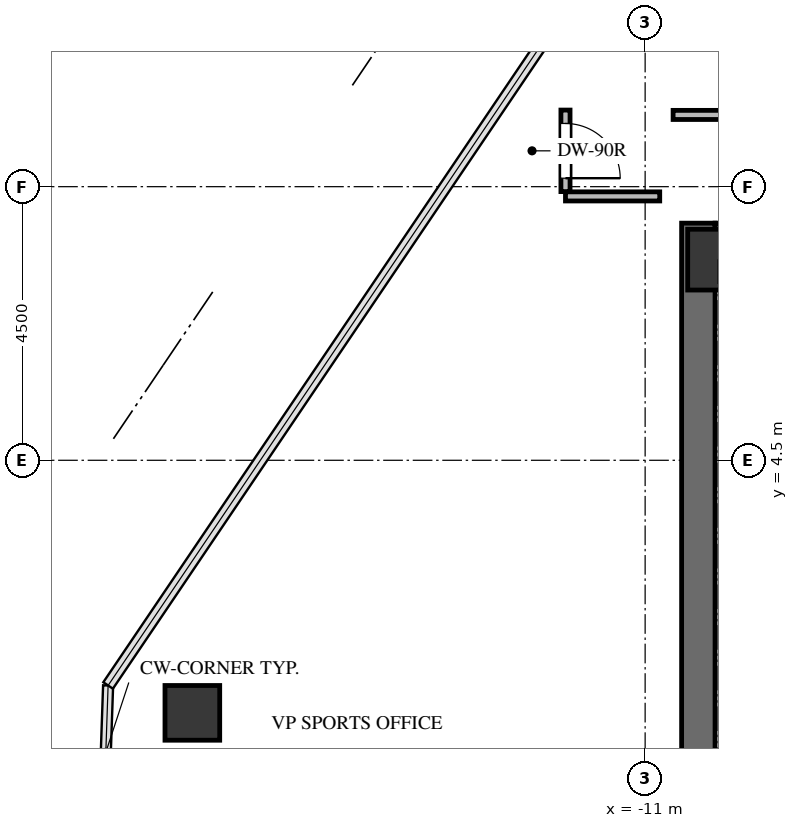
"""IFC4 building model, lengths in metres.
Left out: names, types, materials, properties, quantities, classifications, styles, units other than length and angle.
Written with IfcOpenShell. Run it as: python <this file> out.ifc"""

import sys

from ifc_helpers import new_model, si_unit, direction, frame, frame_2d, origin, origin_2d, place, context, subcontext, project, spatial, rectangle, extrude, source, transform, mapped, element, fill, save


model = new_model("IFC4")
c1 = context("Model", 3, precision=1e-05, world=origin(), true_north=direction((0.0, 1.0)))
c2 = subcontext(c1, "Body", "Model", "MODEL_VIEW")
j1 = project(units=[si_unit("LENGTHUNIT", "METRE"), si_unit("PLANEANGLEUNIT", "RADIAN")], contexts=[c1])
p1 = place(None, origin())
s1 = spatial("IfcSite", under=j1, at=p1, CompositionType="ELEMENT")
p2 = place(p1, origin())
s2 = spatial("IfcBuilding", under=s1, at=p2, CompositionType="ELEMENT")
p3 = place(p2, frame((0.0, 0.0, 228.2)))
s3 = spatial("IfcBuildingStorey", under=s2, at=p3, CompositionType="ELEMENT", Elevation=228.2)
p4 = place(p3, frame((-10.125, -8.4, 0.0), z_axis=(0.0, 0.0, 1.0), x_axis=(0.0, 1.0, 0.0)))
e1 = element("IfcWall", 1, at=p4, inside=s3, PredefinedType="SHEAR", context=c2, shape_type="SweptSolid", body=[
    extrude(rectangle(XDim=16.8, YDim=0.55, at=frame_2d((8.4, 0.0))), origin(), (0.0, 0.0, 1.0), 3.3),
])
p5 = place(p3, frame((-9.85, 8.125, 0.0), z_axis=(0.0, 0.0, 1.0), x_axis=(1.0, 0.0, 0.0)))
e2 = element("IfcWall", 2, at=p5, inside=s3, PredefinedType="SHEAR", context=c2, shape_type="SweptSolid", body=[
    extrude(rectangle(XDim=19.7, YDim=0.55, at=frame_2d((9.85, 0.0))), origin(), (0.0, 0.0, 1.0), 3.3),
])
m1 = source(origin(), c2, "Body", "SweptSolid", [
    extrude(rectangle(XDim=1.0, YDim=1.0, at=origin_2d()), origin(), (0.0, 0.0, 1.0), 3.3),
])
p6 = place(p3, frame((-9.8, 7.8, -0.24), z_axis=(0.0, 0.0, 1.0), x_axis=(1.0, 0.0, 0.0)))
e3 = element("IfcColumn", 3, at=p6, inside=s3, PredefinedType="COLUMN", context=c2, shape_type="MappedRepresentation", body=[
    mapped(m1, transform((0.0, 0.0, 0.0), x_axis=(1.0, 0.0, 0.0), y_axis=(0.0, 1.0, 0.0), z_axis=(0.0, 0.0, 1.0), scale=1.0)),
])
m2 = source(origin(), c2, "Body", "SweptSolid", [
    extrude(rectangle(XDim=0.9, YDim=0.9, at=origin_2d()), origin(), (0.0, 0.0, 1.0), 3.3),
])
p7 = place(p3, frame((-18.446, 0.346, -0.24), z_axis=(0.0, 0.0, 1.0), x_axis=(1.0, 0.0, 0.0)))
e4 = element("IfcColumn", 4, at=p7, inside=s3, PredefinedType="COLUMN", context=c2, shape_type="MappedRepresentation", body=[
    mapped(m2, transform((0.0, 0.0, 0.0), x_axis=(1.0, 0.0, 0.0), y_axis=(0.0, 1.0, 0.0), z_axis=(0.0, 0.0, 1.0), scale=1.0)),
])
p8 = place(p3, frame((-5.96, 10.18, 0.0), z_axis=(0.0, 0.0, 1.0), x_axis=(-1.0, 0.0, 0.0)))
e5 = element("IfcWall", 5, at=p8, inside=s3, PredefinedType="PARTITIONING", context=c2, shape_type="SweptSolid", body=[
    extrude(rectangle(XDim=4.58, YDim=0.15, at=frame_2d((2.29, 0.0))), origin(), (0.0, 0.0, 1.0), 2.301),
])
p9 = place(p8, frame((1.815, 0.0, 0.0)))
e6 = element("IfcOpeningElement", 6, at=p9, cuts=e5, PredefinedType="OPENING", context=c2, shape_type="SweptSolid", body=[
    extrude(rectangle(XDim=0.95, YDim=2.1, at=frame_2d((0.475, 1.05))), frame((0.0, 0.085, 0.0), z_axis=(0.0, -1.0, 0.0), x_axis=(1.0, 0.0, 0.0)), (0.0, 0.0, 1.0), 0.17),
])
p10 = place(p3, frame((-12.31, 8.84, 0.0), z_axis=(0.0, 0.0, 1.0), x_axis=(1.0, 0.0, 0.0)))
e7 = element("IfcWall", 7, at=p10, inside=s3, PredefinedType="PARTITIONING", context=c2, shape_type="SweptSolid", body=[
    extrude(rectangle(XDim=1.55, YDim=0.15, at=frame_2d((0.775, 0.0))), origin(), (0.0, 0.0, 1.0), 3.045),
])
p11 = place(p3, frame((-12.31, 10.26, 0.0), z_axis=(0.0, 0.0, 1.0), x_axis=(0.0, -1.0, 0.0)))
e8 = element("IfcWall", 8, at=p11, inside=s3, PredefinedType="PARTITIONING", context=c2, shape_type="SweptSolid", body=[
    extrude(rectangle(XDim=1.341, YDim=0.15, at=frame_2d((0.67, 0.0))), origin(), (0.0, 0.0, 1.0), 2.399),
])
p12 = place(p11, frame((0.22, 0.0, 0.0)))
e9 = element("IfcOpeningElement", 9, at=p12, cuts=e8, PredefinedType="OPENING", context=c2, shape_type="SweptSolid", body=[
    extrude(rectangle(XDim=0.9, YDim=2.05, at=frame_2d((0.45, 1.025))), frame((0.0, 0.085, 0.0), z_axis=(0.0, -1.0, 0.0), x_axis=(1.0, 0.0, 0.0)), (0.0, 0.0, 1.0), 0.17),
])
m3 = source(origin(), c2, "Body", "SweptSolid", [
    extrude(rectangle(XDim=0.9, YDim=2.05, at=frame_2d((0.45, 1.025))), frame((0.0, 0.025, 0.0), z_axis=(0.0, -1.0, 0.0), x_axis=(1.0, 0.0, 0.0)), (0.0, 0.0, 1.0), 0.05),
])
p13 = place(p12, origin())
e10 = element("IfcDoor", 10, at=p13, inside=s3, OperationType="SINGLE_SWING_RIGHT", PredefinedType="DOOR", context=c2, shape_type="MappedRepresentation", body=[
    mapped(m3, transform((0.0, 0.0, 0.0), x_axis=(1.0, 0.0, 0.0), y_axis=(0.0, 1.0, 0.0), z_axis=(0.0, 0.0, 1.0), scale=1.0)),
])
fill(e9, e10)
save(model, sys.argv[1])
